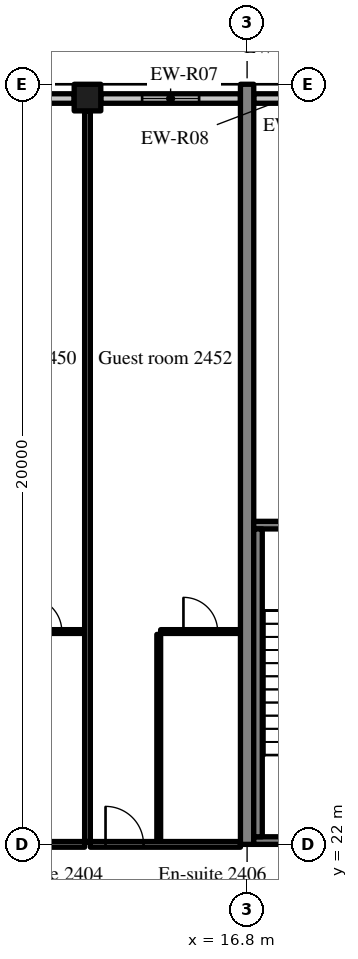
"""IFC4 building model, lengths in metres.
Left out: names, types, materials, properties, quantities, classifications, styles, units other than length and angle.
Written with IfcOpenShell. Run it as: python <this file> out.ifc"""

import sys

from ifc_helpers import new_model, si_unit, direction, frame, frame_2d, origin, origin_2d, place, context, subcontext, project, spatial, rectangle, extrude, source, transform, mapped, element, fill, save


model = new_model("IFC4")
c1 = context("Model", 3, precision=1e-05, world=origin(), true_north=direction((0.0, 1.0)))
c2 = subcontext(c1, "Body", "Model", "MODEL_VIEW")
j1 = project(units=[si_unit("LENGTHUNIT", "METRE"), si_unit("PLANEANGLEUNIT", "RADIAN")], contexts=[c1])
p1 = place(None, origin())
s1 = spatial("IfcSite", under=j1, at=p1, CompositionType="ELEMENT")
p2 = place(p1, origin())
s2 = spatial("IfcBuilding", under=s1, at=p2, CompositionType="ELEMENT")
p3 = place(p2, frame((0.0, 0.0, 102.8)))
s3 = spatial("IfcBuildingStorey", under=s2, at=p3, CompositionType="ELEMENT", Elevation=102.8)
m1 = source(origin(), c2, "Body", "SweptSolid", [
    extrude(rectangle(XDim=20.0, YDim=0.35, at=frame_2d((10.0, 0.0))), origin(), (0.0, 0.0, 1.0), 3.52),
])
p4 = place(p3, frame((16.8, 22.0, 0.0), z_axis=(0.0, 0.0, 1.0), x_axis=(0.0, 1.0, 0.0)))
e1 = element("IfcWall", 1, at=p4, inside=s3, PredefinedType="SHEAR", context=c2, shape_type="MappedRepresentation", body=[
    mapped(m1, transform((0.0, 0.0, 0.0), scale=1.0)),
])
m2 = source(origin(), c2, "Body", "SweptSolid", [
    extrude(rectangle(XDim=0.7, YDim=0.7, at=origin_2d()), origin(), (0.0, 0.0, 1.0), 3.52),
])
p5 = place(p3, frame((12.6, 41.65, 0.0), z_axis=(0.0, 0.0, 1.0), x_axis=(1.0, 0.0, 0.0)))
e2 = element("IfcColumn", 2, at=p5, inside=s3, PredefinedType="COLUMN", context=c2, shape_type="MappedRepresentation", body=[
    mapped(m2, transform((0.0, 0.0, 0.0), scale=1.0)),
])
m3 = source(origin(), c2, "Body", "SweptSolid", [
    extrude(rectangle(XDim=3.675, YDim=0.25, at=frame_2d((1.837, 0.0))), origin(), (0.0, 0.0, 1.0), 2.82),
])
p6 = place(p3, frame((12.25, 41.625, 0.0), z_axis=(0.0, 0.0, 1.0), x_axis=(-1.0, 0.0, 0.0)))
e3 = element("IfcWall", 3, at=p6, inside=s3, PredefinedType="SOLIDWALL", context=c2, shape_type="MappedRepresentation", body=[
    mapped(m3, transform((0.0, 0.0, 0.0), scale=1.0)),
])
m4 = source(origin(), c2, "Body", "SweptSolid", [
    extrude(rectangle(XDim=1.5, YDim=1.5, at=frame_2d((0.75, 0.75))), frame((0.0, 0.135, 0.0), z_axis=(0.0, -1.0, 0.0), x_axis=(1.0, 0.0, 0.0)), (0.0, 0.0, 1.0), 0.27),
])
p7 = place(p6, frame((1.087, 0.0, 0.9)))
e4 = element("IfcOpeningElement", 4, at=p7, cuts=e3, PredefinedType="OPENING", context=c2, shape_type="MappedRepresentation", body=[
    mapped(m4, transform((0.0, 0.0, 0.0), scale=1.0)),
])
p8 = place(p3, frame((16.625, 41.625, 0.0), z_axis=(0.0, 0.0, 1.0), x_axis=(-1.0, 0.0, 0.0)))
e5 = element("IfcWall", 5, at=p8, inside=s3, PredefinedType="SOLIDWALL", context=c2, shape_type="MappedRepresentation", body=[
    mapped(m3, transform((0.0, 0.0, 0.0), scale=1.0)),
])
p9 = place(p8, frame((1.087, 0.0, 0.9)))
e6 = element("IfcOpeningElement", 6, at=p9, cuts=e5, PredefinedType="OPENING", context=c2, shape_type="MappedRepresentation", body=[
    mapped(m4, transform((0.0, 0.0, 0.0), scale=1.0)),
])
m5 = source(origin(), c2, "Body", "SweptSolid", [
    extrude(rectangle(XDim=1.683, YDim=0.25, at=frame_2d((0.841, 0.0))), origin(), (0.0, 0.0, 1.0), 2.82),
])
p10 = place(p3, frame((18.658, 41.625, 0.0), z_axis=(0.0, 0.0, 1.0), x_axis=(-1.0, 0.0, 0.0)))
e7 = element("IfcWall", 7, at=p10, inside=s3, PredefinedType="SOLIDWALL", context=c2, shape_type="MappedRepresentation", body=[
    mapped(m5, transform((0.0, 0.0, 0.0), scale=1.0)),
])
m6 = source(origin(), c2, "Body", "SweptSolid", [
    extrude(rectangle(XDim=8.225, YDim=0.2, at=frame_2d((4.112, 0.0))), origin(), (0.0, 0.0, 1.0), 3.52),
])
p11 = place(p3, frame((16.975, 22.1, 0.0), z_axis=(0.0, 0.0, 1.0), x_axis=(1.0, 0.0, 0.0)))
e8 = element("IfcWall", 8, at=p11, inside=s3, PredefinedType="SOLIDWALL", context=c2, shape_type="MappedRepresentation", body=[
    mapped(m6, transform((0.0, 0.0, 0.0), scale=1.0)),
])
m7 = source(origin(), c2, "Body", "SweptSolid", [
    extrude(rectangle(XDim=1.2, YDim=2.1, at=frame_2d((0.6, 1.05))), frame((0.0, 0.11, 0.0), z_axis=(0.0, -1.0, 0.0), x_axis=(1.0, 0.0, 0.0)), (0.0, 0.0, 1.0), 0.22),
])
p12 = place(p11, frame((6.025, 0.0, 0.0)))
e9 = element("IfcOpeningElement", 9, at=p12, cuts=e8, PredefinedType="OPENING", context=c2, shape_type="MappedRepresentation", body=[
    mapped(m7, transform((0.0, 0.0, 0.0), scale=1.0)),
])
p13 = place(p3, frame((16.975, 30.4, 0.0), z_axis=(0.0, 0.0, 1.0), x_axis=(1.0, 0.0, 0.0)))
e10 = element("IfcWall", 10, at=p13, inside=s3, PredefinedType="SOLIDWALL", context=c2, shape_type="MappedRepresentation", body=[
    mapped(m6, transform((0.0, 0.0, 0.0), scale=1.0)),
])
m8 = source(origin(), c2, "Body", "SweptSolid", [
    extrude(rectangle(XDim=1.0, YDim=2.1, at=frame_2d((0.5, 1.05))), frame((0.0, 0.11, 0.0), z_axis=(0.0, -1.0, 0.0), x_axis=(1.0, 0.0, 0.0)), (0.0, 0.0, 1.0), 0.22),
])
p14 = place(p13, frame((6.125, 0.0, 0.0)))
e11 = element("IfcOpeningElement", 11, at=p14, cuts=e10, PredefinedType="OPENING", context=c2, shape_type="MappedRepresentation", body=[
    mapped(m8, transform((0.0, 0.0, 0.0), scale=1.0)),
])
m9 = source(origin(), c2, "Body", "SweptSolid", [
    extrude(rectangle(XDim=8.1, YDim=0.225, at=frame_2d((4.05, 0.0))), origin(), (0.0, 0.0, 1.0), 3.52),
])
p15 = place(p3, frame((17.087, 22.2, 0.0), z_axis=(0.0, 0.0, 1.0), x_axis=(0.0, 1.0, 0.0)))
e12 = element("IfcWall", 12, at=p15, inside=s3, PredefinedType="SOLIDWALL", context=c2, shape_type="MappedRepresentation", body=[
    mapped(m9, transform((0.0, 0.0, 0.0), scale=1.0)),
])
m10 = source(origin(), c2, "Body", "SweptSolid", [
    extrude(rectangle(XDim=2.1, YDim=0.1, at=frame_2d((1.05, 0.0))), origin(), (0.0, 0.0, 1.0), 3.52),
])
p16 = place(p3, frame((10.425, 27.6, 0.0), z_axis=(0.0, 0.0, 1.0), x_axis=(1.0, 0.0, 0.0)))
e13 = element("IfcWall", 13, at=p16, inside=s3, PredefinedType="PARTITIONING", context=c2, shape_type="MappedRepresentation", body=[
    mapped(m10, transform((0.0, 0.0, 0.0), scale=1.0)),
])
m11 = source(origin(), c2, "Body", "SweptSolid", [
    extrude(rectangle(XDim=0.9, YDim=2.1, at=frame_2d((0.45, 1.05))), frame((0.0, 0.06, 0.0), z_axis=(0.0, -1.0, 0.0), x_axis=(1.0, 0.0, 0.0)), (0.0, 0.0, 1.0), 0.12),
])
p17 = place(p16, frame((0.6, 0.0, 0.0)))
e14 = element("IfcOpeningElement", 14, at=p17, cuts=e13, PredefinedType="OPENING", context=c2, shape_type="MappedRepresentation", body=[
    mapped(m11, transform((0.0, 0.0, 0.0), scale=1.0)),
])
m12 = source(origin(), c2, "Body", "SweptSolid", [
    extrude(rectangle(XDim=3.95, YDim=0.15, at=frame_2d((1.975, 0.0))), origin(), (0.0, 0.0, 1.0), 2.82),
])
p18 = place(p3, frame((8.575, 22.0, 0.0), z_axis=(0.0, 0.0, 1.0), x_axis=(1.0, 0.0, 0.0)))
e15 = element("IfcWall", 15, at=p18, inside=s3, PredefinedType="PARTITIONING", context=c2, shape_type="MappedRepresentation", body=[
    mapped(m12, transform((0.0, 0.0, 0.0), scale=1.0)),
])
m13 = source(origin(), c2, "Body", "SweptSolid", [
    extrude(rectangle(XDim=1.0, YDim=2.1, at=frame_2d((0.5, 1.05))), frame((0.0, 0.085, 0.0), z_axis=(0.0, -1.0, 0.0), x_axis=(1.0, 0.0, 0.0)), (0.0, 0.0, 1.0), 0.17),
])
p19 = place(p18, frame((0.4, 0.0, 0.0)))
e16 = element("IfcOpeningElement", 16, at=p19, cuts=e15, PredefinedType="OPENING", context=c2, shape_type="MappedRepresentation", body=[
    mapped(m13, transform((0.0, 0.0, 0.0), scale=1.0)),
])
m14 = source(origin(), c2, "Body", "SweptSolid", [
    extrude(rectangle(XDim=5.45, YDim=0.1, at=frame_2d((2.725, 0.0))), origin(), (0.0, 0.0, 1.0), 3.52),
])
p20 = place(p3, frame((14.475, 22.075, 0.0), z_axis=(0.0, 0.0, 1.0), x_axis=(0.0, 1.0, 0.0)))
e17 = element("IfcWall", 17, at=p20, inside=s3, PredefinedType="PARTITIONING", context=c2, shape_type="MappedRepresentation", body=[
    mapped(m14, transform((0.0, 0.0, 0.0), scale=1.0)),
])
m15 = source(origin(), c2, "Body", "SweptSolid", [
    extrude(rectangle(XDim=2.1, YDim=0.1, at=frame_2d((1.05, 0.0))), origin(), (0.0, 0.0, 1.0), 3.52),
])
p21 = place(p3, frame((14.525, 27.6, 0.0), z_axis=(0.0, 0.0, 1.0), x_axis=(1.0, 0.0, 0.0)))
e18 = element("IfcWall", 18, at=p21, inside=s3, PredefinedType="PARTITIONING", context=c2, shape_type="MappedRepresentation", body=[
    mapped(m15, transform((0.0, 0.0, 0.0), scale=1.0)),
])
p22 = place(p21, frame((0.6, 0.0, 0.0)))
e19 = element("IfcOpeningElement", 19, at=p22, cuts=e18, PredefinedType="OPENING", context=c2, shape_type="MappedRepresentation", body=[
    mapped(m11, transform((0.0, 0.0, 0.0), scale=1.0)),
])
p23 = place(p3, frame((12.675, 22.0, 0.0), z_axis=(0.0, 0.0, 1.0), x_axis=(1.0, 0.0, 0.0)))
e20 = element("IfcWall", 20, at=p23, inside=s3, PredefinedType="PARTITIONING", context=c2, shape_type="MappedRepresentation", body=[
    mapped(m12, transform((0.0, 0.0, 0.0), scale=1.0)),
])
p24 = place(p23, frame((0.4, 0.0, 0.0)))
e21 = element("IfcOpeningElement", 21, at=p24, cuts=e20, PredefinedType="OPENING", context=c2, shape_type="MappedRepresentation", body=[
    mapped(m13, transform((0.0, 0.0, 0.0), scale=1.0)),
])
m16 = source(origin(), c2, "Body", "SweptSolid", [
    extrude(rectangle(XDim=19.225, YDim=0.15, at=frame_2d((9.613, 0.0))), origin(), (0.0, 0.0, 1.0), 3.52),
])
p25 = place(p3, frame((12.6, 22.075, 0.0), z_axis=(0.0, 0.0, 1.0), x_axis=(0.0, 1.0, 0.0)))
e22 = element("IfcWall", 22, at=p25, inside=s3, PredefinedType="PARTITIONING", context=c2, shape_type="MappedRepresentation", body=[
    mapped(m16, transform((0.0, 0.0, 0.0), scale=1.0)),
])
m17 = source(origin(), c2, "Body", "SweptSolid", [
    extrude(rectangle(XDim=1.5, YDim=1.5, at=frame_2d((0.75, 0.75))), frame((0.0, 0.03, 0.0), z_axis=(0.0, -1.0, 0.0), x_axis=(1.0, 0.0, 0.0)), (0.0, 0.0, 1.0), 0.06),
])
p26 = place(p9, origin())
e23 = element("IfcWindow", 23, at=p26, inside=s3, PartitioningType="SINGLE_PANEL", PredefinedType="WINDOW", context=c2, shape_type="MappedRepresentation", body=[
    mapped(m17, transform((0.0, 0.0, 0.0), scale=1.0)),
])
fill(e6, e23)
m18 = source(origin(), c2, "Body", "SweptSolid", [
    extrude(rectangle(XDim=0.9, YDim=2.1, at=frame_2d((0.45, 1.05))), frame((0.0, 0.025, 0.0), z_axis=(0.0, -1.0, 0.0), x_axis=(1.0, 0.0, 0.0)), (0.0, 0.0, 1.0), 0.05),
])
p27 = place(p17, origin())
e24 = element("IfcDoor", 24, at=p27, inside=s3, OperationType="SINGLE_SWING_LEFT", PredefinedType="DOOR", context=c2, shape_type="MappedRepresentation", body=[
    mapped(m18, transform((0.0, 0.0, 0.0), scale=1.0)),
])
fill(e14, e24)
p28 = place(p22, origin())
e25 = element("IfcDoor", 25, at=p28, inside=s3, OperationType="SINGLE_SWING_LEFT", PredefinedType="DOOR", context=c2, shape_type="MappedRepresentation", body=[
    mapped(m18, transform((0.0, 0.0, 0.0), scale=1.0)),
])
fill(e19, e25)
m19 = source(origin(), c2, "Body", "SweptSolid", [
    extrude(rectangle(XDim=1.0, YDim=2.1, at=frame_2d((0.5, 1.05))), frame((0.0, 0.025, 0.0), z_axis=(0.0, -1.0, 0.0), x_axis=(1.0, 0.0, 0.0)), (0.0, 0.0, 1.0), 0.05),
])
p29 = place(p24, origin())
e26 = element("IfcDoor", 26, at=p29, inside=s3, OperationType="SINGLE_SWING_LEFT", PredefinedType="DOOR", context=c2, shape_type="MappedRepresentation", body=[
    mapped(m19, transform((0.0, 0.0, 0.0), scale=1.0)),
])
fill(e21, e26)
save(model, sys.argv[1])
